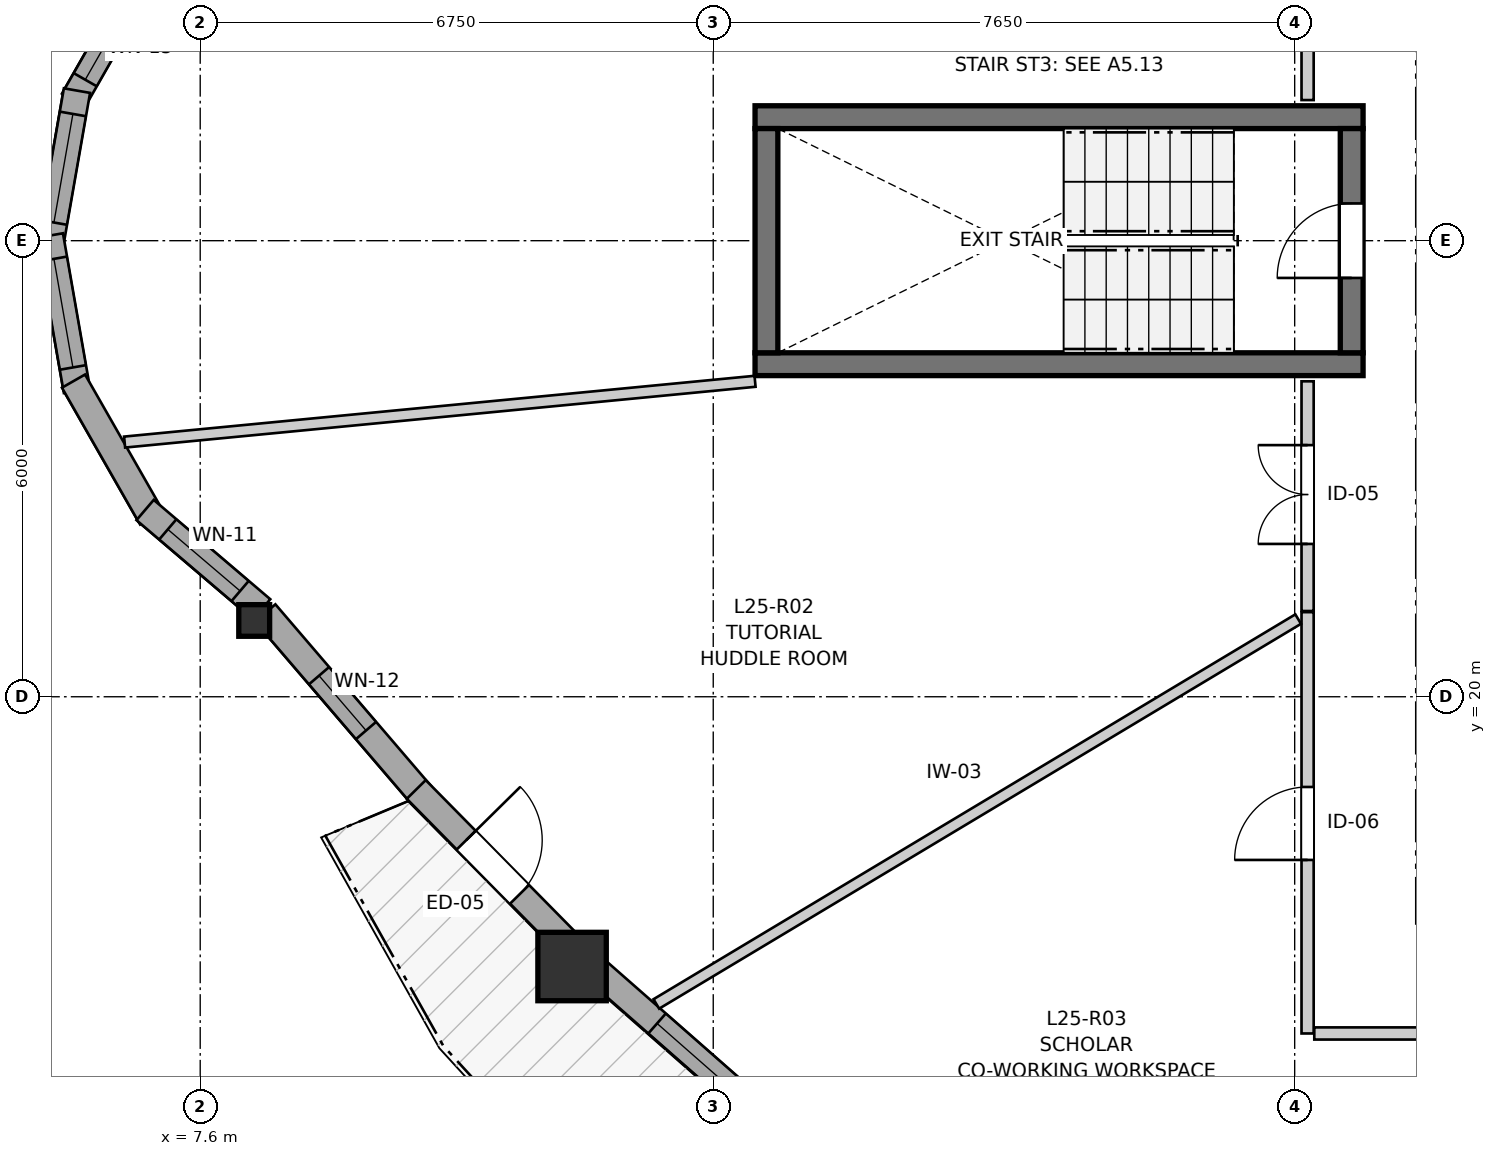
"""IFC4 building model, lengths in metres.
Left out: names, types, materials, properties, quantities, classifications, styles, units other than length and angle.
Written with IfcOpenShell. Run it as: python <this file> out.ifc"""

import sys

from ifc_helpers import new_model, si_unit, direction, frame, frame_2d, origin, origin_2d, place, context, subcontext, project, spatial, rectangle, i_section, extrude, source, transform, mapped, element, fill, save


model = new_model("IFC4")
c1 = context("Model", 3, precision=1e-05, world=origin(), true_north=direction((0.0, 1.0)))
c2 = subcontext(c1, "Body", "Model", "MODEL_VIEW")
j1 = project(units=[si_unit("LENGTHUNIT", "METRE"), si_unit("PLANEANGLEUNIT", "RADIAN")], contexts=[c1])
p1 = place(None, origin())
s1 = spatial("IfcSite", under=j1, at=p1, CompositionType="ELEMENT")
p2 = place(p1, origin())
s2 = spatial("IfcBuilding", under=s1, at=p2, CompositionType="ELEMENT")
p3 = place(p2, frame((0.0, 0.0, 86.4)))
s3 = spatial("IfcBuildingStorey", under=s2, at=p3, CompositionType="ELEMENT", Elevation=86.4)
for number, where, z_axis, x_axis in (
    (1, (14.9, 24.375, 0.0), (0.0, 0.0, 1.0), (1.0, 0.0, 0.0)),
    (2, (22.9, 27.625, 0.0), (0.0, 0.0, 1.0), (-1.0, 0.0, 0.0)),
):
    element("IfcWall", number, at=place(p3, frame(where, z_axis=z_axis, x_axis=x_axis)), inside=s3, PredefinedType="SHEAR", context=c2, shape_type="SweptSolid", body=[
        extrude(rectangle(XDim=8.0, YDim=0.3, at=frame_2d((4.0, 0.0))), origin(), (0.0, 0.0, 1.0), 2.95),
    ])
p4 = place(p3, frame((15.05, 27.475, 0.0), z_axis=(0.0, 0.0, 1.0), x_axis=(0.0, -1.0, 0.0)))
e3 = element("IfcWall", 3, at=p4, inside=s3, PredefinedType="SHEAR", context=c2, shape_type="SweptSolid", body=[
    extrude(rectangle(XDim=2.95, YDim=0.3, at=frame_2d((1.475, 0.0))), origin(), (0.0, 0.0, 1.0), 2.95),
])
p5 = place(p3, frame((22.75, 24.525, 0.0), z_axis=(0.0, 0.0, 1.0), x_axis=(0.0, 1.0, 0.0)))
e4 = element("IfcWall", 4, at=p5, inside=s3, PredefinedType="SHEAR", context=c2, shape_type="SweptSolid", body=[
    extrude(rectangle(XDim=2.95, YDim=0.3, at=frame_2d((1.475, 0.0))), origin(), (0.0, 0.0, 1.0), 2.95),
])
p6 = place(p5, frame((0.985, 0.0, 0.0)))
e5 = element("IfcOpeningElement", 5, at=p6, cuts=e4, PredefinedType="OPENING", context=c2, shape_type="SweptSolid", body=[
    extrude(rectangle(XDim=0.98, YDim=2.15, at=frame_2d((0.49, 1.075))), frame((0.0, 0.16, 0.0), z_axis=(0.0, -1.0, 0.0), x_axis=(1.0, 0.0, 0.0)), (0.0, 0.0, 1.0), 0.32),
])
m1 = source(origin(), c2, "Body", "SweptSolid", [
    extrude(i_section(OverallWidth=0.406, OverallDepth=0.416, WebThickness=0.027, FlangeThickness=0.044, FilletRadius=0.015, at=origin_2d()), origin(), (0.0, 0.0, 1.0), 2.95),
])
p7 = place(p3, frame((8.31, 21.004, 0.0), z_axis=(0.0, 0.0, 1.0), x_axis=(1.0, 0.0, 0.0)))
e6 = element("IfcColumn", 6, at=p7, inside=s3, PredefinedType="PILASTER", context=c2, shape_type="MappedRepresentation", body=[
    mapped(m1, transform((0.0, 0.0, 0.0), x_axis=(1.0, 0.0, 0.0), y_axis=(0.0, 1.0, 0.0), z_axis=(0.0, 0.0, 1.0), scale=1.0)),
])
m2 = source(origin(), c2, "Body", "SweptSolid", [
    extrude(rectangle(XDim=0.9, YDim=0.9, at=origin_2d()), origin(), (0.0, 0.0, 1.0), 2.95),
])
p8 = place(p3, frame((12.493, 16.451, 0.0), z_axis=(0.0, 0.0, 1.0), x_axis=(1.0, 0.0, 0.0)))
e7 = element("IfcColumn", 7, at=p8, inside=s3, PredefinedType="COLUMN", context=c2, shape_type="MappedRepresentation", body=[
    mapped(m2, transform((0.0, 0.0, 0.0), x_axis=(1.0, 0.0, 0.0), y_axis=(0.0, 1.0, 0.0), z_axis=(0.0, 0.0, 1.0), scale=1.0)),
])
p9 = place(p3, frame((6.961, 29.647, 0.0), z_axis=(0.0, 0.0, 1.0), x_axis=(-0.496037473582, -0.868301114132, 0.0)))
e8 = element("IfcWall", 8, at=p9, inside=s3, PredefinedType="SOLIDWALL", context=c2, shape_type="SweptSolid", body=[
    extrude(rectangle(XDim=2.073, YDim=0.35, at=frame_2d((1.037, 0.0))), origin(), (0.0, 0.0, 1.0), 2.48),
])
p10 = place(p9, frame((0.312, 0.0, 0.82)))
e9 = element("IfcOpeningElement", 9, at=p10, cuts=e8, PredefinedType="OPENING", context=c2, shape_type="SweptSolid", body=[
    extrude(rectangle(XDim=1.45, YDim=1.25, at=frame_2d((0.725, 0.625))), frame((0.0, 0.185, 0.0), z_axis=(0.0, -1.0, 0.0), x_axis=(1.0, 0.0, 0.0)), (0.0, 0.0, 1.0), 0.37),
])
p11 = place(p3, frame((5.979, 27.975, 0.0), z_axis=(0.0, 0.0, 1.0), x_axis=(-0.172166087538, -0.985067935881, 0.0)))
e10 = element("IfcWall", 10, at=p11, inside=s3, PredefinedType="SOLIDWALL", context=c2, shape_type="SweptSolid", body=[
    extrude(rectangle(XDim=2.073, YDim=0.35, at=frame_2d((1.037, 0.0))), origin(), (0.0, 0.0, 1.0), 2.48),
])
p12 = place(p11, frame((0.312, 0.0, 0.82)))
e11 = element("IfcOpeningElement", 11, at=p12, cuts=e10, PredefinedType="OPENING", context=c2, shape_type="SweptSolid", body=[
    extrude(rectangle(XDim=1.45, YDim=1.25, at=frame_2d((0.725, 0.625))), frame((0.0, 0.185, 0.0), z_axis=(0.0, -1.0, 0.0), x_axis=(1.0, 0.0, 0.0)), (0.0, 0.0, 1.0), 0.37),
])
p13 = place(p3, frame((5.622, 26.068, 0.0), z_axis=(0.0, 0.0, 1.0), x_axis=(0.172166087538, -0.985067935881, 0.0)))
e12 = element("IfcWall", 12, at=p13, inside=s3, PredefinedType="SOLIDWALL", context=c2, shape_type="SweptSolid", body=[
    extrude(rectangle(XDim=2.073, YDim=0.35, at=frame_2d((1.037, 0.0))), origin(), (0.0, 0.0, 1.0), 2.48),
])
p14 = place(p13, frame((0.312, 0.0, 0.82)))
e13 = element("IfcOpeningElement", 13, at=p14, cuts=e12, PredefinedType="OPENING", context=c2, shape_type="SweptSolid", body=[
    extrude(rectangle(XDim=1.45, YDim=1.25, at=frame_2d((0.725, 0.625))), frame((0.0, 0.185, 0.0), z_axis=(0.0, -1.0, 0.0), x_axis=(1.0, 0.0, 0.0)), (0.0, 0.0, 1.0), 0.37),
])
p15 = place(p3, frame((5.933, 24.153, 0.0), z_axis=(0.0, 0.0, 1.0), x_axis=(0.496037473582, -0.868301114132, 0.0)))
e14 = element("IfcWall", 14, at=p15, inside=s3, PredefinedType="SOLIDWALL", context=c2, shape_type="SweptSolid", body=[
    extrude(rectangle(XDim=2.073, YDim=0.35, at=frame_2d((1.037, 0.0))), origin(), (0.0, 0.0, 1.0), 2.48),
])
p16 = place(p3, frame((6.875, 22.457, 0.0), z_axis=(0.0, 0.0, 1.0), x_axis=(0.761203352049, -0.648513266502, 0.0)))
e15 = element("IfcWall", 15, at=p16, inside=s3, PredefinedType="SOLIDWALL", context=c2, shape_type="SweptSolid", body=[
    extrude(rectangle(XDim=2.015, YDim=0.35, at=frame_2d((1.007, 0.0))), origin(), (0.0, 0.0, 1.0), 2.48),
])
p17 = place(p16, frame((0.393, 0.0, 0.82)))
e16 = element("IfcOpeningElement", 16, at=p17, cuts=e15, PredefinedType="OPENING", context=c2, shape_type="SweptSolid", body=[
    extrude(rectangle(XDim=1.25, YDim=1.35, at=frame_2d((0.625, 0.675))), frame((0.0, 0.185, 0.0), z_axis=(0.0, -1.0, 0.0), x_axis=(1.0, 0.0, 0.0)), (0.0, 0.0, 1.0), 0.37),
])
p18 = place(p3, frame((8.456, 21.102, 0.0), z_axis=(0.0, 0.0, 1.0), x_axis=(0.650733809993, -0.759305938692, 0.0)))
e17 = element("IfcWall", 17, at=p18, inside=s3, PredefinedType="SOLIDWALL", context=c2, shape_type="SweptSolid", body=[
    extrude(rectangle(XDim=3.144, YDim=0.35, at=frame_2d((1.572, 0.0))), origin(), (0.0, 0.0, 1.0), 2.48),
])
p19 = place(p18, frame((1.087, 0.0, 0.82)))
e18 = element("IfcOpeningElement", 18, at=p19, cuts=e17, PredefinedType="OPENING", context=c2, shape_type="SweptSolid", body=[
    extrude(rectangle(XDim=0.95, YDim=1.35, at=frame_2d((0.475, 0.675))), frame((0.0, 0.185, 0.0), z_axis=(0.0, -1.0, 0.0), x_axis=(1.0, 0.0, 0.0)), (0.0, 0.0, 1.0), 0.37),
])
p20 = place(p3, frame((10.442, 18.78, 0.0), z_axis=(0.0, 0.0, 1.0), x_axis=(0.7019473345, -0.712228853381, 0.0)))
e19 = element("IfcWall", 19, at=p20, inside=s3, PredefinedType="SOLIDWALL", context=c2, shape_type="SweptSolid", body=[
    extrude(rectangle(XDim=2.873, YDim=0.35, at=frame_2d((1.437, 0.0))), origin(), (0.0, 0.0, 1.0), 2.48),
])
p21 = place(p20, frame((0.937, 0.0, 0.0)))
e20 = element("IfcOpeningElement", 20, at=p21, cuts=e19, PredefinedType="OPENING", context=c2, shape_type="SweptSolid", body=[
    extrude(rectangle(XDim=1.0, YDim=2.1, at=frame_2d((0.5, 1.05))), frame((0.0, 0.185, 0.0), z_axis=(0.0, -1.0, 0.0), x_axis=(1.0, 0.0, 0.0)), (0.0, 0.0, 1.0), 0.37),
])
p22 = place(p3, frame((12.777, 16.434, 0.0), z_axis=(0.0, 0.0, 1.0), x_axis=(0.751531192513, -0.659697556976, 0.0)))
e21 = element("IfcWall", 21, at=p22, inside=s3, PredefinedType="SOLIDWALL", context=c2, shape_type="SweptSolid", body=[
    extrude(rectangle(XDim=2.823, YDim=0.35, at=frame_2d((1.412, 0.0))), origin(), (0.0, 0.0, 1.0), 2.48),
])
p23 = place(p22, frame((1.11, 0.0, 0.82)))
e22 = element("IfcOpeningElement", 22, at=p23, cuts=e21, PredefinedType="OPENING", context=c2, shape_type="SweptSolid", body=[
    extrude(rectangle(XDim=1.45, YDim=1.25, at=frame_2d((0.725, 0.625))), frame((0.0, 0.185, 0.0), z_axis=(0.0, -1.0, 0.0), x_axis=(1.0, 0.0, 0.0)), (0.0, 0.0, 1.0), 0.37),
])
p24 = place(p3, frame((22.17, 15.57, 0.0), z_axis=(0.0, 0.0, 1.0), x_axis=(0.0, 1.0, 0.0)))
e23 = element("IfcWall", 23, at=p24, inside=s3, PredefinedType="PARTITIONING", context=c2, shape_type="SweptSolid", body=[
    extrude(rectangle(XDim=5.543, YDim=0.16, at=frame_2d((2.771, 0.0))), origin(), (0.0, 0.0, 1.0), 2.95),
])
p25 = place(p24, frame((2.283, 0.0, 0.0)))
e24 = element("IfcOpeningElement", 24, at=p25, cuts=e23, PredefinedType="OPENING", context=c2, shape_type="SweptSolid", body=[
    extrude(rectangle(XDim=0.96, YDim=2.1, at=frame_2d((0.48, 1.05))), frame((0.0, 0.09, 0.0), z_axis=(0.0, -1.0, 0.0), x_axis=(1.0, 0.0, 0.0)), (0.0, 0.0, 1.0), 0.18),
])
p26 = place(p3, frame((22.17, 27.85, 0.0), z_axis=(0.0, 0.0, 1.0), x_axis=(0.0, 1.0, 0.0)))
e25 = element("IfcWall", 25, at=p26, inside=s3, PredefinedType="PARTITIONING", context=c2, shape_type="SweptSolid", body=[
    extrude(rectangle(XDim=5.276, YDim=0.16, at=frame_2d((2.638, 0.0))), origin(), (0.0, 0.0, 1.0), 2.95),
])
p27 = place(p26, frame((2.689, 0.0, 0.0)))
e26 = element("IfcOpeningElement", 26, at=p27, cuts=e25, PredefinedType="OPENING", context=c2, shape_type="SweptSolid", body=[
    extrude(rectangle(XDim=1.3, YDim=2.1, at=frame_2d((0.65, 1.05))), frame((0.0, 0.09, 0.0), z_axis=(0.0, -1.0, 0.0), x_axis=(1.0, 0.0, 0.0)), (0.0, 0.0, 1.0), 0.18),
])
p28 = place(p3, frame((22.17, 21.128, 0.0), z_axis=(0.0, 0.0, 1.0), x_axis=(0.0, 1.0, 0.0)))
e27 = element("IfcWall", 27, at=p28, inside=s3, PredefinedType="PARTITIONING", context=c2, shape_type="SweptSolid", body=[
    extrude(rectangle(XDim=3.022, YDim=0.16, at=frame_2d((1.511, 0.0))), origin(), (0.0, 0.0, 1.0), 2.95),
])
p29 = place(p28, frame((0.883, 0.0, 0.0)))
e28 = element("IfcOpeningElement", 28, at=p29, cuts=e27, PredefinedType="OPENING", context=c2, shape_type="SweptSolid", body=[
    extrude(rectangle(XDim=1.3, YDim=2.1, at=frame_2d((0.65, 1.05))), frame((0.0, 0.09, 0.0), z_axis=(0.0, -1.0, 0.0), x_axis=(1.0, 0.0, 0.0)), (0.0, 0.0, 1.0), 0.18),
])
p30 = place(p3, frame((13.601, 15.958, 0.0), z_axis=(0.0, 0.0, 1.0), x_axis=(0.857661345212, 0.514214952066, 0.0)))
e29 = element("IfcWall", 29, at=p30, inside=s3, PredefinedType="PARTITIONING", context=c2, shape_type="SweptSolid", body=[
    extrude(rectangle(XDim=9.846, YDim=0.145, at=frame_2d((4.923, 0.0))), origin(), (0.0, 0.0, 1.0), 2.95),
])
p31 = place(p3, frame((6.605, 23.351, 0.0), z_axis=(0.0, 0.0, 1.0), x_axis=(0.995388985265, 0.09592063393, 0.0)))
e30 = element("IfcWall", 30, at=p31, inside=s3, PredefinedType="PARTITIONING", context=c2, shape_type="SweptSolid", body=[
    extrude(rectangle(XDim=8.333, YDim=0.145, at=frame_2d((4.167, 0.0))), origin(), (0.0, 0.0, 1.0), 2.95),
])
p32 = place(p3, frame((23.186, 9.634, 0.0), z_axis=(0.0, 0.0, 1.0), x_axis=(0.400994208685, 0.916080588486, 0.0)))
e31 = element("IfcWall", 31, at=p32, inside=s3, PredefinedType="PARTITIONING", context=c2, shape_type="SweptSolid", body=[
    extrude(rectangle(XDim=6.353, YDim=0.145, at=frame_2d((3.177, 0.0))), origin(), (0.0, 0.0, 1.0), 2.95),
])
p33 = place(p3, frame((22.258, 15.57, 0.0), z_axis=(0.0, 0.0, 1.0), x_axis=(1.0, 0.0, 0.0)))
e32 = element("IfcWall", 32, at=p33, inside=s3, PredefinedType="PARTITIONING", context=c2, shape_type="SweptSolid", body=[
    extrude(rectangle(XDim=3.373, YDim=0.16, at=frame_2d((1.687, 0.0))), origin(), (0.0, 0.0, 1.0), 2.95),
])
m3 = source(origin(), c2, "Body", "SweptSolid", [
    extrude(rectangle(XDim=1.45, YDim=1.25, at=frame_2d((0.725, 0.625))), frame((0.0, 0.03, 0.0), z_axis=(0.0, -1.0, 0.0), x_axis=(1.0, 0.0, 0.0)), (0.0, 0.0, 1.0), 0.06),
])
p34 = place(p10, origin())
e33 = element("IfcWindow", 33, at=p34, inside=s3, PartitioningType="SINGLE_PANEL", PredefinedType="WINDOW", context=c2, shape_type="MappedRepresentation", body=[
    mapped(m3, transform((0.0, 0.0, 0.0), x_axis=(1.0, 0.0, 0.0), y_axis=(0.0, 1.0, 0.0), z_axis=(0.0, 0.0, 1.0), scale=1.0)),
])
fill(e9, e33)
p35 = place(p12, origin())
e34 = element("IfcWindow", 34, at=p35, inside=s3, PartitioningType="SINGLE_PANEL", PredefinedType="WINDOW", context=c2, shape_type="MappedRepresentation", body=[
    mapped(m3, transform((0.0, 0.0, 0.0), x_axis=(1.0, 0.0, 0.0), y_axis=(0.0, 1.0, 0.0), z_axis=(0.0, 0.0, 1.0), scale=1.0)),
])
fill(e11, e34)
p36 = place(p14, origin())
e35 = element("IfcWindow", 35, at=p36, inside=s3, PartitioningType="SINGLE_PANEL", PredefinedType="WINDOW", context=c2, shape_type="MappedRepresentation", body=[
    mapped(m3, transform((0.0, 0.0, 0.0), x_axis=(1.0, 0.0, 0.0), y_axis=(0.0, 1.0, 0.0), z_axis=(0.0, 0.0, 1.0), scale=1.0)),
])
fill(e13, e35)
m4 = source(origin(), c2, "Body", "SweptSolid", [
    extrude(rectangle(XDim=1.25, YDim=1.35, at=frame_2d((0.625, 0.675))), frame((0.0, 0.03, 0.0), z_axis=(0.0, -1.0, 0.0), x_axis=(1.0, 0.0, 0.0)), (0.0, 0.0, 1.0), 0.06),
])
p37 = place(p17, origin())
e36 = element("IfcWindow", 36, at=p37, inside=s3, PartitioningType="SINGLE_PANEL", PredefinedType="WINDOW", context=c2, shape_type="MappedRepresentation", body=[
    mapped(m4, transform((0.0, 0.0, 0.0), x_axis=(1.0, 0.0, 0.0), y_axis=(0.0, 1.0, 0.0), z_axis=(0.0, 0.0, 1.0), scale=1.0)),
])
fill(e16, e36)
m5 = source(origin(), c2, "Body", "SweptSolid", [
    extrude(rectangle(XDim=0.95, YDim=1.35, at=frame_2d((0.475, 0.675))), frame((0.0, 0.03, 0.0), z_axis=(0.0, -1.0, 0.0), x_axis=(1.0, 0.0, 0.0)), (0.0, 0.0, 1.0), 0.06),
])
p38 = place(p19, origin())
e37 = element("IfcWindow", 37, at=p38, inside=s3, PartitioningType="SINGLE_PANEL", PredefinedType="WINDOW", context=c2, shape_type="MappedRepresentation", body=[
    mapped(m5, transform((0.0, 0.0, 0.0), x_axis=(1.0, 0.0, 0.0), y_axis=(0.0, 1.0, 0.0), z_axis=(0.0, 0.0, 1.0), scale=1.0)),
])
fill(e18, e37)
p39 = place(p23, origin())
e38 = element("IfcWindow", 38, at=p39, inside=s3, PartitioningType="SINGLE_PANEL", PredefinedType="WINDOW", context=c2, shape_type="MappedRepresentation", body=[
    mapped(m3, transform((0.0, 0.0, 0.0), x_axis=(1.0, 0.0, 0.0), y_axis=(0.0, 1.0, 0.0), z_axis=(0.0, 0.0, 1.0), scale=1.0)),
])
fill(e22, e38)
m6 = source(origin(), c2, "Body", "SweptSolid", [
    extrude(rectangle(XDim=1.0, YDim=2.1, at=frame_2d((0.5, 1.05))), frame((0.0, 0.025, 0.0), z_axis=(0.0, -1.0, 0.0), x_axis=(1.0, 0.0, 0.0)), (0.0, 0.0, 1.0), 0.05),
])
p40 = place(p21, origin())
e39 = element("IfcDoor", 39, at=p40, inside=s3, OperationType="SINGLE_SWING_LEFT", PredefinedType="DOOR", context=c2, shape_type="MappedRepresentation", body=[
    mapped(m6, transform((0.0, 0.0, 0.0), x_axis=(1.0, 0.0, 0.0), y_axis=(0.0, 1.0, 0.0), z_axis=(0.0, 0.0, 1.0), scale=1.0)),
])
fill(e20, e39)
m7 = source(origin(), c2, "Body", "SweptSolid", [
    extrude(rectangle(XDim=0.98, YDim=2.15, at=frame_2d((0.49, 1.075))), frame((0.0, 0.025, 0.0), z_axis=(0.0, -1.0, 0.0), x_axis=(1.0, 0.0, 0.0)), (0.0, 0.0, 1.0), 0.05),
])
p41 = place(p6, origin())
e40 = element("IfcDoor", 40, at=p41, inside=s3, OperationType="SINGLE_SWING_LEFT", PredefinedType="DOOR", context=c2, shape_type="MappedRepresentation", body=[
    mapped(m7, transform((0.0, 0.0, 0.0), x_axis=(1.0, 0.0, 0.0), y_axis=(0.0, 1.0, 0.0), z_axis=(0.0, 0.0, 1.0), scale=1.0)),
])
fill(e5, e40)
m8 = source(origin(), c2, "Body", "SweptSolid", [
    extrude(rectangle(XDim=0.96, YDim=2.1, at=frame_2d((0.48, 1.05))), frame((0.0, 0.025, 0.0), z_axis=(0.0, -1.0, 0.0), x_axis=(1.0, 0.0, 0.0)), (0.0, 0.0, 1.0), 0.05),
])
p42 = place(p25, origin())
e41 = element("IfcDoor", 41, at=p42, inside=s3, OperationType="SINGLE_SWING_LEFT", PredefinedType="DOOR", context=c2, shape_type="MappedRepresentation", body=[
    mapped(m8, transform((0.0, 0.0, 0.0), x_axis=(1.0, 0.0, 0.0), y_axis=(0.0, 1.0, 0.0), z_axis=(0.0, 0.0, 1.0), scale=1.0)),
])
fill(e24, e41)
m9 = source(origin(), c2, "Body", "SweptSolid", [
    extrude(rectangle(XDim=1.3, YDim=2.1, at=frame_2d((0.65, 1.05))), frame((0.0, 0.025, 0.0), z_axis=(0.0, -1.0, 0.0), x_axis=(1.0, 0.0, 0.0)), (0.0, 0.0, 1.0), 0.05),
])
p43 = place(p29, origin())
e42 = element("IfcDoor", 42, at=p43, inside=s3, OperationType="DOUBLE_DOOR_SINGLE_SWING", PredefinedType="DOOR", context=c2, shape_type="MappedRepresentation", body=[
    mapped(m9, transform((0.0, 0.0, 0.0), x_axis=(1.0, 0.0, 0.0), y_axis=(0.0, 1.0, 0.0), z_axis=(0.0, 0.0, 1.0), scale=1.0)),
])
fill(e28, e42)
save(model, sys.argv[1])
